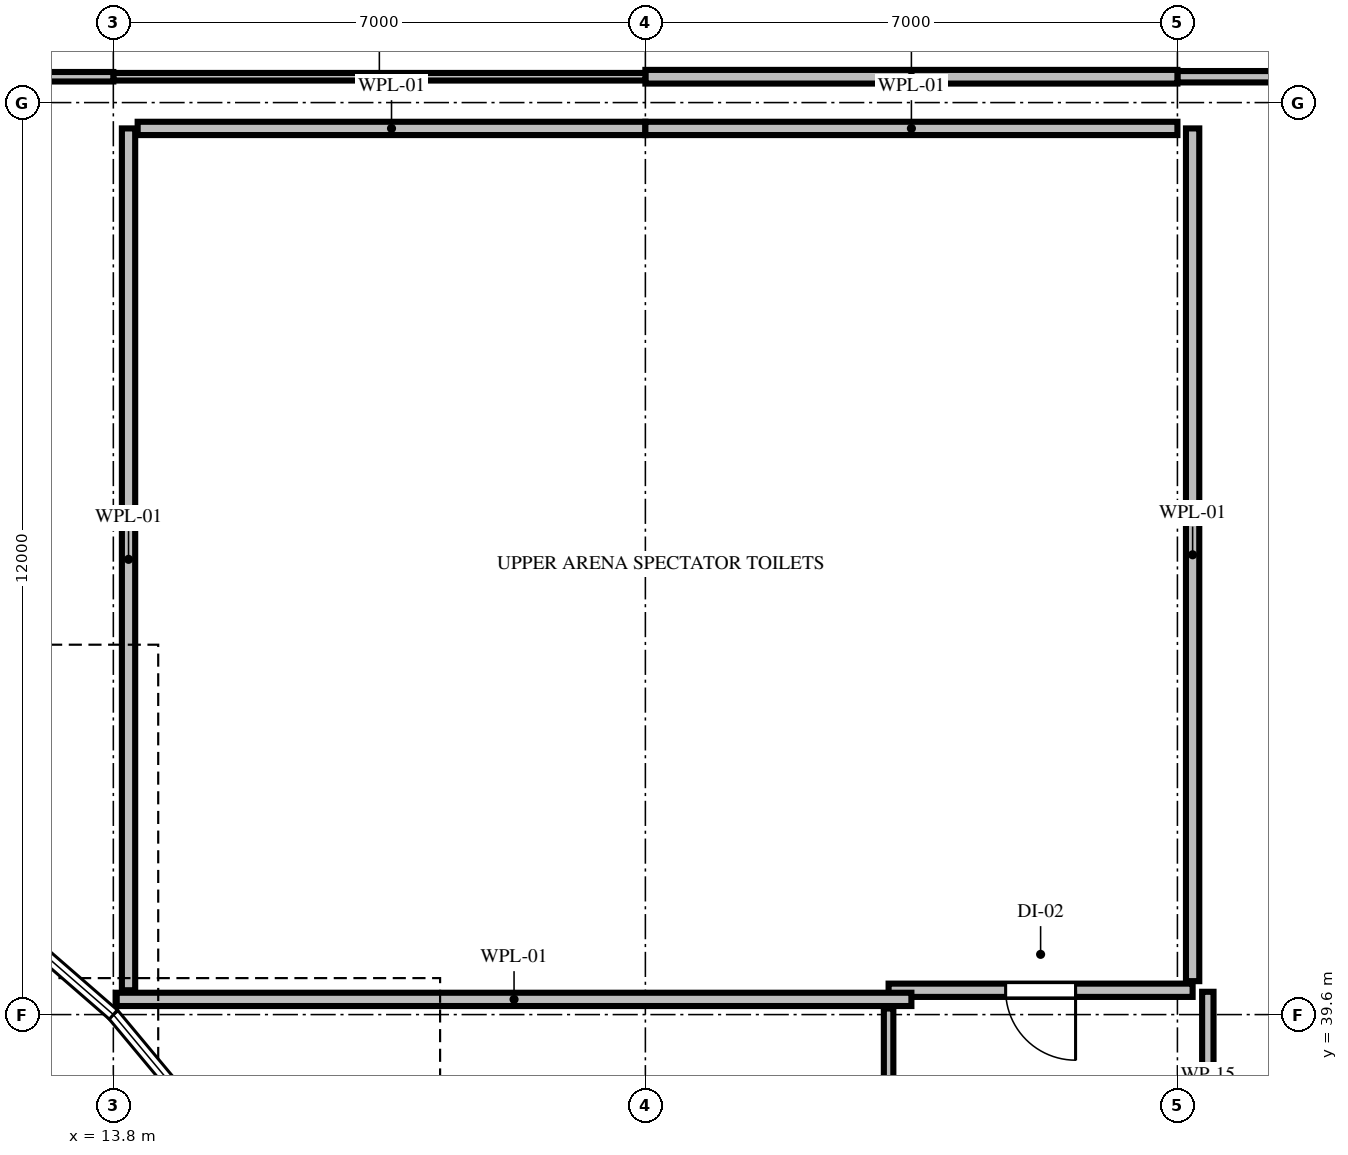
"""IFC4 building model, lengths in metres.
Left out: names, types, materials, properties, quantities, classifications, styles, units other than length and angle.
Written with IfcOpenShell. Run it as: python <this file> out.ifc"""

import sys

from ifc_helpers import new_model, si_unit, direction, frame, frame_2d, origin, place, context, subcontext, project, spatial, rectangle, extrude, element, fill, save


model = new_model("IFC4")
c1 = context("Model", 3, precision=1e-05, world=origin(), true_north=direction((0.0, 1.0)))
c2 = subcontext(c1, "Body", "Model", "MODEL_VIEW")
j1 = project(units=[si_unit("LENGTHUNIT", "METRE"), si_unit("PLANEANGLEUNIT", "RADIAN")], contexts=[c1])
p1 = place(None, origin())
s1 = spatial("IfcSite", under=j1, at=p1, CompositionType="ELEMENT")
p2 = place(p1, origin())
s2 = spatial("IfcBuilding", under=s1, at=p2, CompositionType="ELEMENT")
p3 = place(p2, frame((0.0, 0.0, 16.8)))
s3 = spatial("IfcBuildingStorey", under=s2, at=p3, CompositionType="ELEMENT", Elevation=16.8)
p4 = place(p3, frame((34.8, 51.94, 0.0), z_axis=(0.0, 0.0, 1.0), x_axis=(-1.0, 0.0, 0.0)))
e1 = element("IfcWall", 1, at=p4, inside=s3, PredefinedType="PARTITIONING", context=c2, shape_type="SweptSolid", body=[
    extrude(rectangle(XDim=7.0, YDim=0.15, at=frame_2d((3.5, 0.0))), origin(), (0.0, 0.0, 1.0), 5.05),
])
p5 = place(p3, frame((27.8, 51.94, 0.0), z_axis=(0.0, 0.0, 1.0), x_axis=(-1.0, 0.0, 0.0)))
e2 = element("IfcWall", 2, at=p5, inside=s3, PredefinedType="PARTITIONING", context=c2, shape_type="SweptSolid", body=[
    extrude(rectangle(XDim=7.0, YDim=0.18, at=frame_2d((3.5, 0.0))), origin(), (0.0, 0.0, 1.0), 5.05),
])
p6 = place(p3, frame((20.8, 51.94, 0.0), z_axis=(0.0, 0.0, 1.0), x_axis=(-1.0, 0.0, 0.0)))
e3 = element("IfcWall", 3, at=p6, inside=s3, PredefinedType="PARTITIONING", context=c2, shape_type="SweptSolid", body=[
    extrude(rectangle(XDim=7.0, YDim=0.1, at=frame_2d((3.5, 0.0))), origin(), (0.0, 0.0, 1.0), 5.05),
])
p7 = place(p3, frame((13.8, 51.94, 0.0), z_axis=(0.0, 0.0, 1.0), x_axis=(-1.0, 0.0, 0.0)))
e4 = element("IfcWall", 4, at=p7, inside=s3, PredefinedType="PARTITIONING", context=c2, shape_type="SweptSolid", body=[
    extrude(rectangle(XDim=6.9, YDim=0.125, at=frame_2d((3.45, 0.0))), origin(), (0.0, 0.0, 1.0), 4.65),
])
p8 = place(p3, frame((28.0, 39.92, 0.0), z_axis=(0.0, 0.0, 1.0), x_axis=(-1.0, 0.0, 0.0)))
e5 = element("IfcWall", 5, at=p8, inside=s3, PredefinedType="PLUMBINGWALL", context=c2, shape_type="SweptSolid", body=[
    extrude(rectangle(XDim=4.0, YDim=0.175, at=frame_2d((2.0, 0.0))), origin(), (0.0, 0.0, 1.0), 5.05),
])
p9 = place(p8, frame((1.54, 0.0, 0.0)))
e6 = element("IfcOpeningElement", 6, at=p9, cuts=e5, PredefinedType="OPENING", context=c2, shape_type="SweptSolid", body=[
    extrude(rectangle(XDim=0.92, YDim=2.15, at=frame_2d((0.46, 1.075))), frame((0.0, 0.097, 0.0), z_axis=(0.0, -1.0, 0.0), x_axis=(1.0, 0.0, 0.0)), (0.0, 0.0, 1.0), 0.195),
])
p10 = place(p3, frame((24.3, 39.8, 0.0), z_axis=(0.0, 0.0, 1.0), x_axis=(-1.0, 0.0, 0.0)))
e7 = element("IfcWall", 7, at=p10, inside=s3, PredefinedType="PLUMBINGWALL", context=c2, shape_type="SweptSolid", body=[
    extrude(rectangle(XDim=10.456, YDim=0.175, at=frame_2d((5.228, 0.0))), origin(), (0.0, 0.0, 1.0), 5.05),
])
p11 = place(p3, frame((14.0, 39.92, 0.0), z_axis=(0.0, 0.0, 1.0), x_axis=(0.0, 1.0, 0.0)))
e8 = element("IfcWall", 8, at=p11, inside=s3, PredefinedType="PLUMBINGWALL", context=c2, shape_type="SweptSolid", body=[
    extrude(rectangle(XDim=11.34, YDim=0.175, at=frame_2d((5.67, 0.0))), origin(), (0.0, 0.0, 1.0), 5.05),
])
p12 = place(p3, frame((14.12, 51.26, 0.0), z_axis=(0.0, 0.0, 1.0), x_axis=(1.0, 0.0, 0.0)))
e9 = element("IfcWall", 9, at=p12, inside=s3, PredefinedType="PLUMBINGWALL", context=c2, shape_type="SweptSolid", body=[
    extrude(rectangle(XDim=6.68, YDim=0.175, at=frame_2d((3.34, 0.0))), origin(), (0.0, 0.0, 1.0), 5.05),
])
p13 = place(p3, frame((20.8, 51.26, 0.0), z_axis=(0.0, 0.0, 1.0), x_axis=(1.0, 0.0, 0.0)))
e10 = element("IfcWall", 10, at=p13, inside=s3, PredefinedType="PLUMBINGWALL", context=c2, shape_type="SweptSolid", body=[
    extrude(rectangle(XDim=7.0, YDim=0.175, at=frame_2d((3.5, 0.0))), origin(), (0.0, 0.0, 1.0), 5.05),
])
p14 = place(p3, frame((28.0, 51.26, 0.0), z_axis=(0.0, 0.0, 1.0), x_axis=(0.0, -1.0, 0.0)))
e11 = element("IfcWall", 11, at=p14, inside=s3, PredefinedType="PLUMBINGWALL", context=c2, shape_type="SweptSolid", body=[
    extrude(rectangle(XDim=11.22, YDim=0.175, at=frame_2d((5.61, 0.0))), origin(), (0.0, 0.0, 1.0), 5.05),
])
p15 = place(p3, frame((24.0, 32.12, 0.0), z_axis=(0.0, 0.0, 1.0), x_axis=(0.0, 1.0, 0.0)))
e12 = element("IfcWall", 12, at=p15, inside=s3, PredefinedType="PARTITIONING", context=c2, shape_type="SweptSolid", body=[
    extrude(rectangle(XDim=7.56, YDim=0.125, at=frame_2d((3.78, 0.0))), origin(), (0.0, 0.0, 1.0), 5.05),
])
p16 = place(p3, frame((28.2, 39.9, 0.0), z_axis=(0.0, 0.0, 1.0), x_axis=(0.0, -1.0, 0.0)))
e13 = element("IfcWall", 13, at=p16, inside=s3, PredefinedType="PARTITIONING", context=c2, shape_type="SweptSolid", body=[
    extrude(rectangle(XDim=3.3, YDim=0.15, at=frame_2d((1.65, 0.0))), origin(), (0.0, 0.0, 1.0), 5.05),
])
p17 = place(p9, origin())
e14 = element("IfcDoor", 14, at=p17, inside=s3, OperationType="SINGLE_SWING_LEFT", PredefinedType="DOOR", context=c2, shape_type="SweptSolid", body=[
    extrude(rectangle(XDim=0.92, YDim=2.15, at=frame_2d((0.46, 1.075))), frame((0.0, 0.025, 0.0), z_axis=(0.0, -1.0, 0.0), x_axis=(1.0, 0.0, 0.0)), (0.0, 0.0, 1.0), 0.05),
])
fill(e6, e14)
save(model, sys.argv[1])
